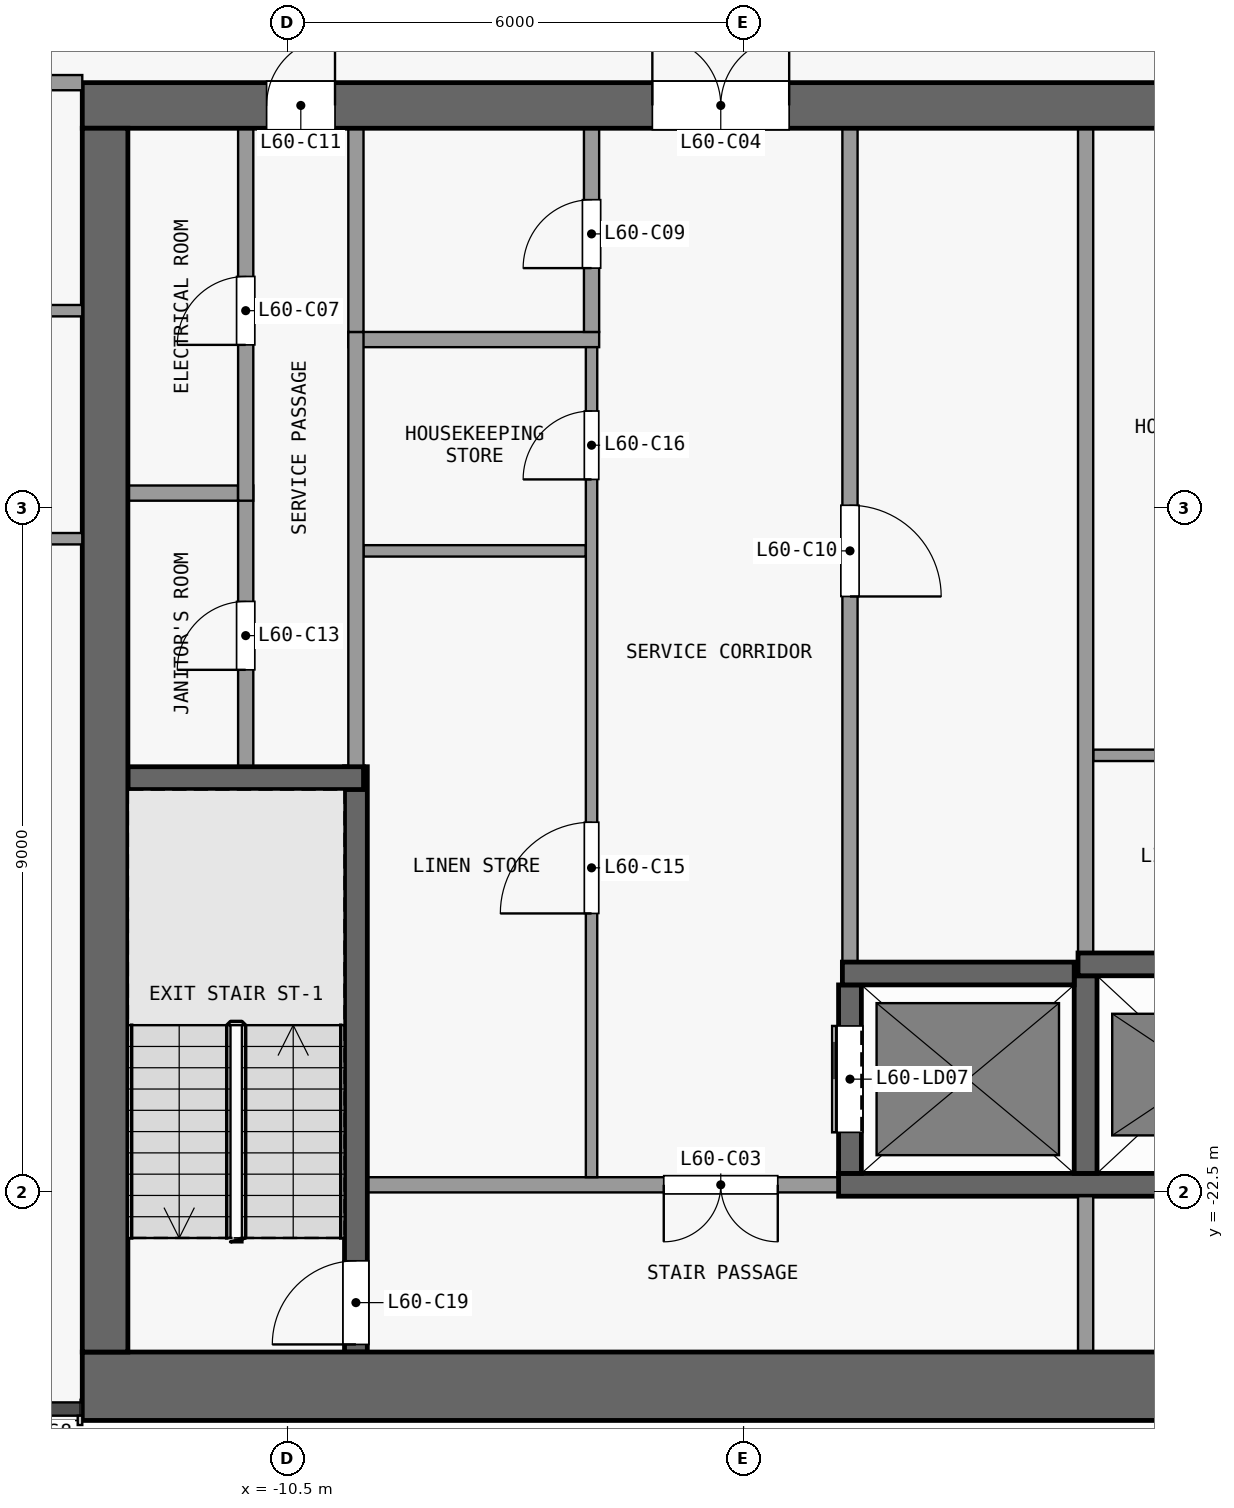
"""IFC4 building model, lengths in metres.
Left out: names, types, materials, properties, quantities, classifications, styles, units other than length and angle.
Written with IfcOpenShell. Run it as: python <this file> out.ifc"""

import sys

from ifc_helpers import new_model, si_unit, direction, frame, frame_2d, origin, place, context, subcontext, project, spatial, rectangle, extrude, element, fill, save


model = new_model("IFC4")
c1 = context("Model", 3, precision=1e-05, world=origin(), true_north=direction((0.0, 1.0)))
c2 = subcontext(c1, "Body", "Model", "MODEL_VIEW")
j1 = project(units=[si_unit("LENGTHUNIT", "METRE"), si_unit("PLANEANGLEUNIT", "RADIAN")], contexts=[c1])
p1 = place(None, origin())
s1 = spatial("IfcSite", under=j1, at=p1, CompositionType="ELEMENT")
p2 = place(p1, origin())
s2 = spatial("IfcBuilding", under=s1, at=p2, CompositionType="ELEMENT")
p3 = place(p2, frame((0.0, 0.0, 237.5)))
s3 = spatial("IfcBuildingStorey", under=s2, at=p3, CompositionType="ELEMENT", Elevation=237.5)
p4 = place(p3, frame((-13.2, -25.05, 0.0), z_axis=(0.0, 0.0, 1.0), x_axis=(1.0, 0.0, 0.0)))
e1 = element("IfcWall", 1, at=p4, inside=s3, PredefinedType="SHEAR", context=c2, shape_type="SweptSolid", body=[
    extrude(rectangle(XDim=26.4, YDim=0.9, at=frame_2d((13.2, 0.0))), origin(), (0.0, 0.0, 1.0), 3.3),
])
p5 = place(p3, frame((-13.2, -8.2, 0.0), z_axis=(0.0, 0.0, 1.0), x_axis=(1.0, 0.0, 0.0)))
e2 = element("IfcWall", 2, at=p5, inside=s3, PredefinedType="SHEAR", context=c2, shape_type="SweptSolid", body=[
    extrude(rectangle(XDim=26.4, YDim=0.6, at=frame_2d((13.2, 0.0))), origin(), (0.0, 0.0, 1.0), 3.3),
])
p6 = place(p5, frame((7.5, 0.0, 0.0)))
e3 = element("IfcOpeningElement", 3, at=p6, cuts=e2, PredefinedType="OPENING", context=c2, shape_type="SweptSolid", body=[
    extrude(rectangle(XDim=1.8, YDim=2.1, at=frame_2d((0.9, 1.05))), frame((0.0, 0.31, 0.0), z_axis=(0.0, -1.0, 0.0), x_axis=(1.0, 0.0, 0.0)), (0.0, 0.0, 1.0), 0.62),
])
p7 = place(p5, frame((17.1, 0.0, 0.0)))
e4 = element("IfcOpeningElement", 4, at=p7, cuts=e2, PredefinedType="OPENING", context=c2, shape_type="SweptSolid", body=[
    extrude(rectangle(XDim=1.8, YDim=2.1, at=frame_2d((0.9, 1.05))), frame((0.0, 0.31, 0.0), z_axis=(0.0, -1.0, 0.0), x_axis=(1.0, 0.0, 0.0)), (0.0, 0.0, 1.0), 0.62),
])
p8 = place(p5, frame((2.425, 0.0, 0.0)))
e5 = element("IfcOpeningElement", 5, at=p8, cuts=e2, PredefinedType="OPENING", context=c2, shape_type="SweptSolid", body=[
    extrude(rectangle(XDim=0.9, YDim=2.1, at=frame_2d((0.45, 1.05))), frame((0.0, 0.31, 0.0), z_axis=(0.0, -1.0, 0.0), x_axis=(1.0, 0.0, 0.0)), (0.0, 0.0, 1.0), 0.62),
])
p9 = place(p5, frame((23.075, 0.0, 0.0)))
e6 = element("IfcOpeningElement", 6, at=p9, cuts=e2, PredefinedType="OPENING", context=c2, shape_type="SweptSolid", body=[
    extrude(rectangle(XDim=0.9, YDim=2.1, at=frame_2d((0.45, 1.05))), frame((0.0, 0.31, 0.0), z_axis=(0.0, -1.0, 0.0), x_axis=(1.0, 0.0, 0.0)), (0.0, 0.0, 1.0), 0.62),
])
p10 = place(p3, frame((-12.9, -24.6, 0.0), z_axis=(0.0, 0.0, 1.0), x_axis=(0.0, 1.0, 0.0)))
e7 = element("IfcWall", 7, at=p10, inside=s3, PredefinedType="SHEAR", context=c2, shape_type="SweptSolid", body=[
    extrude(rectangle(XDim=16.1, YDim=0.6, at=frame_2d((8.05, 0.0))), origin(), (0.0, 0.0, 1.0), 3.3),
])
p11 = place(p3, frame((-3.25, -22.4, 0.0), z_axis=(0.0, 0.0, 1.0), x_axis=(-1.0, 0.0, 0.0)))
e8 = element("IfcWall", 8, at=p11, inside=s3, PredefinedType="PARTITIONING", context=c2, shape_type="SweptSolid", body=[
    extrude(rectangle(XDim=6.2, YDim=0.2, at=frame_2d((3.1, 0.0))), origin(), (0.0, 0.0, 1.0), 3.3),
])
p12 = place(p11, frame((0.8, 0.0, 0.0)))
e9 = element("IfcOpeningElement", 9, at=p12, cuts=e8, PredefinedType="OPENING", context=c2, shape_type="SweptSolid", body=[
    extrude(rectangle(XDim=1.5, YDim=2.1, at=frame_2d((0.75, 1.05))), frame((0.0, 0.11, 0.0), z_axis=(0.0, -1.0, 0.0), x_axis=(1.0, 0.0, 0.0)), (0.0, 0.0, 1.0), 0.22),
])
p13 = place(p3, frame((-3.25, -22.4, 0.0), z_axis=(0.0, 0.0, 1.0), x_axis=(1.0, 0.0, 0.0)))
e10 = element("IfcWall", 10, at=p13, inside=s3, PredefinedType="SHEAR", context=c2, shape_type="SweptSolid", body=[
    extrude(rectangle(XDim=6.5, YDim=0.3, at=frame_2d((3.25, 0.0))), origin(), (0.0, 0.0, 1.0), 3.3),
])
p14 = place(p3, frame((-3.2, -19.62, 0.0), z_axis=(0.0, 0.0, 1.0), x_axis=(1.0, 0.0, 0.0)))
e11 = element("IfcWall", 11, at=p14, inside=s3, PredefinedType="SHEAR", context=c2, shape_type="SweptSolid", body=[
    extrude(rectangle(XDim=3.05, YDim=0.3, at=frame_2d((1.525, 0.0))), origin(), (0.0, 0.0, 1.0), 3.3),
])
p15 = place(p3, frame((-0.1, -19.5, 0.0), z_axis=(0.0, 0.0, 1.0), x_axis=(1.0, 0.0, 0.0)))
e12 = element("IfcWall", 12, at=p15, inside=s3, PredefinedType="SHEAR", context=c2, shape_type="SweptSolid", body=[
    extrude(rectangle(XDim=3.275, YDim=0.3, at=frame_2d((1.638, 0.0))), origin(), (0.0, 0.0, 1.0), 3.3),
])
p16 = place(p3, frame((-12.6, -17.05, 0.0), z_axis=(0.0, 0.0, 1.0), x_axis=(1.0, 0.0, 0.0)))
e13 = element("IfcWall", 13, at=p16, inside=s3, PredefinedType="SHEAR", context=c2, shape_type="SweptSolid", body=[
    extrude(rectangle(XDim=3.1, YDim=0.3, at=frame_2d((1.55, 0.0))), origin(), (0.0, 0.0, 1.0), 3.3),
])
p17 = place(p3, frame((0.1, -16.75, 0.0), z_axis=(0.0, 0.0, 1.0), x_axis=(1.0, 0.0, 0.0)))
e14 = element("IfcWall", 14, at=p17, inside=s3, PredefinedType="PARTITIONING", context=c2, shape_type="SweptSolid", body=[
    extrude(rectangle(XDim=2.925, YDim=0.15, at=frame_2d((1.462, 0.0))), origin(), (0.0, 0.0, 1.0), 3.3),
])
p18 = place(p3, frame((-9.5, -14.06, 0.0), z_axis=(0.0, 0.0, 1.0), x_axis=(1.0, 0.0, 0.0)))
e15 = element("IfcWall", 15, at=p18, inside=s3, PredefinedType="PARTITIONING", context=c2, shape_type="SweptSolid", body=[
    extrude(rectangle(XDim=2.925, YDim=0.15, at=frame_2d((1.462, 0.0))), origin(), (0.0, 0.0, 1.0), 3.3),
])
p19 = place(p3, frame((-12.6, -13.3, 0.0), z_axis=(0.0, 0.0, 1.0), x_axis=(1.0, 0.0, 0.0)))
e16 = element("IfcWall", 16, at=p19, inside=s3, PredefinedType="PARTITIONING", context=c2, shape_type="SweptSolid", body=[
    extrude(rectangle(XDim=1.45, YDim=0.2, at=frame_2d((0.725, 0.0))), origin(), (0.0, 0.0, 1.0), 3.3),
])
p20 = place(p3, frame((-9.7, -11.28, 0.0), z_axis=(0.0, 0.0, 1.0), x_axis=(1.0, 0.0, 0.0)))
e17 = element("IfcWall", 17, at=p20, inside=s3, PredefinedType="PARTITIONING", context=c2, shape_type="SweptSolid", body=[
    extrude(rectangle(XDim=3.3, YDim=0.2, at=frame_2d((1.65, 0.0))), origin(), (0.0, 0.0, 1.0), 3.3),
])
p21 = place(p3, frame((-11.05, -16.9, 0.0), z_axis=(0.0, 0.0, 1.0), x_axis=(0.0, 1.0, 0.0)))
e18 = element("IfcWall", 18, at=p21, inside=s3, PredefinedType="PARTITIONING", context=c2, shape_type="SweptSolid", body=[
    extrude(rectangle(XDim=3.7, YDim=0.2, at=frame_2d((1.85, 0.0))), origin(), (0.0, 0.0, 1.0), 3.3),
])
p22 = place(p21, frame((1.275, 0.0, 0.0)))
e19 = element("IfcOpeningElement", 19, at=p22, cuts=e18, PredefinedType="OPENING", context=c2, shape_type="SweptSolid", body=[
    extrude(rectangle(XDim=0.9, YDim=2.1, at=frame_2d((0.45, 1.05))), frame((0.0, 0.11, 0.0), z_axis=(0.0, -1.0, 0.0), x_axis=(1.0, 0.0, 0.0)), (0.0, 0.0, 1.0), 0.22),
])
p23 = place(p3, frame((-11.05, -13.4, 0.0), z_axis=(0.0, 0.0, 1.0), x_axis=(0.0, 1.0, 0.0)))
e20 = element("IfcWall", 20, at=p23, inside=s3, PredefinedType="PARTITIONING", context=c2, shape_type="SweptSolid", body=[
    extrude(rectangle(XDim=4.9, YDim=0.2, at=frame_2d((2.45, 0.0))), origin(), (0.0, 0.0, 1.0), 3.3),
])
p24 = place(p23, frame((2.05, 0.0, 0.0)))
e21 = element("IfcOpeningElement", 21, at=p24, cuts=e20, PredefinedType="OPENING", context=c2, shape_type="SweptSolid", body=[
    extrude(rectangle(XDim=0.9, YDim=2.1, at=frame_2d((0.45, 1.05))), frame((0.0, 0.11, 0.0), z_axis=(0.0, -1.0, 0.0), x_axis=(1.0, 0.0, 0.0)), (0.0, 0.0, 1.0), 0.22),
])
p25 = place(p3, frame((-9.6, -24.6, 0.0), z_axis=(0.0, 0.0, 1.0), x_axis=(0.0, 1.0, 0.0)))
e22 = element("IfcWall", 22, at=p25, inside=s3, PredefinedType="SHEAR", context=c2, shape_type="SweptSolid", body=[
    extrude(rectangle(XDim=7.7, YDim=0.3, at=frame_2d((3.85, 0.0))), origin(), (0.0, 0.0, 1.0), 3.3),
])
p26 = place(p25, frame((0.1, 0.0, 0.0)))
e23 = element("IfcOpeningElement", 23, at=p26, cuts=e22, PredefinedType="OPENING", context=c2, shape_type="SweptSolid", body=[
    extrude(rectangle(XDim=1.1, YDim=2.1, at=frame_2d((0.55, 1.05))), frame((0.0, 0.16, 0.0), z_axis=(0.0, -1.0, 0.0), x_axis=(1.0, 0.0, 0.0)), (0.0, 0.0, 1.0), 0.32),
])
p27 = place(p3, frame((-9.6, -16.9, 0.0), z_axis=(0.0, 0.0, 1.0), x_axis=(0.0, 1.0, 0.0)))
e24 = element("IfcWall", 24, at=p27, inside=s3, PredefinedType="PARTITIONING", context=c2, shape_type="SweptSolid", body=[
    extrude(rectangle(XDim=5.72, YDim=0.2, at=frame_2d((2.86, 0.0))), origin(), (0.0, 0.0, 1.0), 3.3),
])
p28 = place(p3, frame((-9.6, -11.18, 0.0), z_axis=(0.0, 0.0, 1.0), x_axis=(0.0, 1.0, 0.0)))
e25 = element("IfcWall", 25, at=p28, inside=s3, PredefinedType="PARTITIONING", context=c2, shape_type="SweptSolid", body=[
    extrude(rectangle(XDim=2.68, YDim=0.2, at=frame_2d((1.34, 0.0))), origin(), (0.0, 0.0, 1.0), 3.3),
])
p29 = place(p3, frame((-6.5, -22.3, 0.0), z_axis=(0.0, 0.0, 1.0), x_axis=(0.0, 1.0, 0.0)))
e26 = element("IfcWall", 26, at=p29, inside=s3, PredefinedType="PARTITIONING", context=c2, shape_type="SweptSolid", body=[
    extrude(rectangle(XDim=10.92, YDim=0.15, at=frame_2d((5.46, 0.0))), origin(), (0.0, 0.0, 1.0), 3.3),
])
p30 = place(p29, frame((3.47, 0.0, 0.0)))
e27 = element("IfcOpeningElement", 27, at=p30, cuts=e26, PredefinedType="OPENING", context=c2, shape_type="SweptSolid", body=[
    extrude(rectangle(XDim=1.2, YDim=2.1, at=frame_2d((0.6, 1.05))), frame((0.0, 0.085, 0.0), z_axis=(0.0, -1.0, 0.0), x_axis=(1.0, 0.0, 0.0)), (0.0, 0.0, 1.0), 0.17),
])
p31 = place(p29, frame((9.18, 0.0, 0.0)))
e28 = element("IfcOpeningElement", 28, at=p31, cuts=e26, PredefinedType="OPENING", context=c2, shape_type="SweptSolid", body=[
    extrude(rectangle(XDim=0.9, YDim=2.1, at=frame_2d((0.45, 1.05))), frame((0.0, 0.085, 0.0), z_axis=(0.0, -1.0, 0.0), x_axis=(1.0, 0.0, 0.0)), (0.0, 0.0, 1.0), 0.17),
])
p32 = place(p3, frame((-6.5, -11.18, 0.0), z_axis=(0.0, 0.0, 1.0), x_axis=(0.0, 1.0, 0.0)))
e29 = element("IfcWall", 29, at=p32, inside=s3, PredefinedType="PARTITIONING", context=c2, shape_type="SweptSolid", body=[
    extrude(rectangle(XDim=2.68, YDim=0.2, at=frame_2d((1.34, 0.0))), origin(), (0.0, 0.0, 1.0), 3.3),
])
p33 = place(p32, frame((0.84, 0.0, 0.0)))
e30 = element("IfcOpeningElement", 30, at=p33, cuts=e29, PredefinedType="OPENING", context=c2, shape_type="SweptSolid", body=[
    extrude(rectangle(XDim=0.9, YDim=2.1, at=frame_2d((0.45, 1.05))), frame((0.0, 0.11, 0.0), z_axis=(0.0, -1.0, 0.0), x_axis=(1.0, 0.0, 0.0)), (0.0, 0.0, 1.0), 0.22),
])
p34 = place(p3, frame((-3.1, -22.25, 0.0), z_axis=(0.0, 0.0, 1.0), x_axis=(0.0, 1.0, 0.0)))
e31 = element("IfcWall", 31, at=p34, inside=s3, PredefinedType="SHEAR", context=c2, shape_type="SweptSolid", body=[
    extrude(rectangle(XDim=2.48, YDim=0.3, at=frame_2d((1.24, 0.0))), origin(), (0.0, 0.0, 1.0), 3.3),
])
p35 = place(p34, frame((0.54, 0.0, 0.0)))
e32 = element("IfcOpeningElement", 32, at=p35, cuts=e31, PredefinedType="OPENING", context=c2, shape_type="SweptSolid", body=[
    extrude(rectangle(XDim=1.4, YDim=2.1, at=frame_2d((0.7, 1.05))), frame((0.0, 0.16, 0.0), z_axis=(0.0, -1.0, 0.0), x_axis=(1.0, 0.0, 0.0)), (0.0, 0.0, 1.0), 0.32),
])
p36 = place(p3, frame((-3.1, -8.5, 0.0), z_axis=(0.0, 0.0, 1.0), x_axis=(0.0, -1.0, 0.0)))
e33 = element("IfcWall", 33, at=p36, inside=s3, PredefinedType="PARTITIONING", context=c2, shape_type="SweptSolid", body=[
    extrude(rectangle(XDim=10.97, YDim=0.2, at=frame_2d((5.485, 0.0))), origin(), (0.0, 0.0, 1.0), 3.3),
])
p37 = place(p36, frame((4.96, 0.0, 0.0)))
e34 = element("IfcOpeningElement", 34, at=p37, cuts=e33, PredefinedType="OPENING", context=c2, shape_type="SweptSolid", body=[
    extrude(rectangle(XDim=1.2, YDim=2.1, at=frame_2d((0.6, 1.05))), frame((0.0, 0.11, 0.0), z_axis=(0.0, -1.0, 0.0), x_axis=(1.0, 0.0, 0.0)), (0.0, 0.0, 1.0), 0.22),
])
p38 = place(p3, frame((0.0, -24.6, 0.0), z_axis=(0.0, 0.0, 1.0), x_axis=(0.0, 1.0, 0.0)))
e35 = element("IfcWall", 35, at=p38, inside=s3, PredefinedType="PARTITIONING", context=c2, shape_type="SweptSolid", body=[
    extrude(rectangle(XDim=2.05, YDim=0.2, at=frame_2d((1.025, 0.0))), origin(), (0.0, 0.0, 1.0), 3.3),
])
p39 = place(p3, frame((0.0, -22.25, 0.0), z_axis=(0.0, 0.0, 1.0), x_axis=(0.0, 1.0, 0.0)))
e36 = element("IfcWall", 36, at=p39, inside=s3, PredefinedType="SHEAR", context=c2, shape_type="SweptSolid", body=[
    extrude(rectangle(XDim=2.6, YDim=0.3, at=frame_2d((1.3, 0.0))), origin(), (0.0, 0.0, 1.0), 3.3),
])
p40 = place(p3, frame((0.0, -19.35, 0.0), z_axis=(0.0, 0.0, 1.0), x_axis=(0.0, 1.0, 0.0)))
e37 = element("IfcWall", 37, at=p40, inside=s3, PredefinedType="PARTITIONING", context=c2, shape_type="SweptSolid", body=[
    extrude(rectangle(XDim=10.85, YDim=0.2, at=frame_2d((5.425, 0.0))), origin(), (0.0, 0.0, 1.0), 3.3),
])
p41 = place(p3, frame((-19.262, -13.9, 0.0), z_axis=(0.0, 0.0, 1.0), x_axis=(1.0, 0.0, 0.0)))
e38 = element("IfcWall", 38, at=p41, inside=s3, PredefinedType="PARTITIONING", context=c2, shape_type="SweptSolid", body=[
    extrude(rectangle(XDim=6.062, YDim=0.15, at=frame_2d((3.031, 0.0))), origin(), (0.0, 0.0, 1.0), 3.3),
])
p42 = place(p41, frame((0.712, 0.0, 0.0)))
e39 = element("IfcOpeningElement", 39, at=p42, cuts=e38, PredefinedType="OPENING", context=c2, shape_type="SweptSolid", body=[
    extrude(rectangle(XDim=0.9, YDim=2.1, at=frame_2d((0.45, 1.05))), frame((0.0, 0.085, 0.0), z_axis=(0.0, -1.0, 0.0), x_axis=(1.0, 0.0, 0.0)), (0.0, 0.0, 1.0), 0.17),
])
p43 = place(p3, frame((-19.262, -10.9, 0.0), z_axis=(0.0, 0.0, 1.0), x_axis=(1.0, 0.0, 0.0)))
e40 = element("IfcWall", 40, at=p43, inside=s3, PredefinedType="PARTITIONING", context=c2, shape_type="SweptSolid", body=[
    extrude(rectangle(XDim=6.062, YDim=0.15, at=frame_2d((3.031, 0.0))), origin(), (0.0, 0.0, 1.0), 3.3),
])
p44 = place(p43, frame((1.012, 0.0, 0.0)))
e41 = element("IfcOpeningElement", 41, at=p44, cuts=e40, PredefinedType="OPENING", context=c2, shape_type="SweptSolid", body=[
    extrude(rectangle(XDim=0.9, YDim=2.1, at=frame_2d((0.45, 1.05))), frame((0.0, 0.085, 0.0), z_axis=(0.0, -1.0, 0.0), x_axis=(1.0, 0.0, 0.0)), (0.0, 0.0, 1.0), 0.17),
])
p45 = place(p43, frame((4.162, 0.0, 0.0)))
e42 = element("IfcOpeningElement", 42, at=p45, cuts=e40, PredefinedType="OPENING", context=c2, shape_type="SweptSolid", body=[
    extrude(rectangle(XDim=0.9, YDim=2.1, at=frame_2d((0.45, 1.05))), frame((0.0, 0.085, 0.0), z_axis=(0.0, -1.0, 0.0), x_axis=(1.0, 0.0, 0.0)), (0.0, 0.0, 1.0), 0.17),
])
p46 = place(p3, frame((-19.262, -7.9, 0.0), z_axis=(0.0, 0.0, 1.0), x_axis=(1.0, 0.0, 0.0)))
e43 = element("IfcWall", 43, at=p46, inside=s3, PredefinedType="PARTITIONING", context=c2, shape_type="SweptSolid", body=[
    extrude(rectangle(XDim=6.062, YDim=0.2, at=frame_2d((3.031, 0.0))), origin(), (0.0, 0.0, 1.0), 3.3),
])
p47 = place(p46, frame((2.512, 0.0, 0.0)))
e44 = element("IfcOpeningElement", 44, at=p47, cuts=e43, PredefinedType="OPENING", context=c2, shape_type="SweptSolid", body=[
    extrude(rectangle(XDim=1.0, YDim=2.1, at=frame_2d((0.5, 1.05))), frame((0.0, 0.11, 0.0), z_axis=(0.0, -1.0, 0.0), x_axis=(1.0, 0.0, 0.0)), (0.0, 0.0, 1.0), 0.22),
])
p48 = place(p35, origin())
e45 = element("IfcDoor", 45, at=p48, inside=s3, OperationType="DOUBLE_DOOR_SLIDING", PredefinedType="DOOR", context=c2, shape_type="SweptSolid", body=[
    extrude(rectangle(XDim=1.4, YDim=2.1, at=frame_2d((0.7, 1.05))), frame((0.0, 0.025, 0.0), z_axis=(0.0, -1.0, 0.0), x_axis=(1.0, 0.0, 0.0)), (0.0, 0.0, 1.0), 0.05),
])
fill(e32, e45)
p49 = place(p12, origin())
e46 = element("IfcDoor", 46, at=p49, inside=s3, OperationType="DOUBLE_DOOR_SINGLE_SWING", PredefinedType="DOOR", context=c2, shape_type="SweptSolid", body=[
    extrude(rectangle(XDim=1.5, YDim=2.1, at=frame_2d((0.75, 1.05))), frame((0.0, 0.025, 0.0), z_axis=(0.0, -1.0, 0.0), x_axis=(1.0, 0.0, 0.0)), (0.0, 0.0, 1.0), 0.05),
])
fill(e9, e46)
p50 = place(p6, origin())
e47 = element("IfcDoor", 47, at=p50, inside=s3, OperationType="DOUBLE_DOOR_SINGLE_SWING", PredefinedType="DOOR", context=c2, shape_type="SweptSolid", body=[
    extrude(rectangle(XDim=1.8, YDim=2.1, at=frame_2d((0.9, 1.05))), frame((0.0, 0.025, 0.0), z_axis=(0.0, -1.0, 0.0), x_axis=(1.0, 0.0, 0.0)), (0.0, 0.0, 1.0), 0.05),
])
fill(e3, e47)
p51 = place(p24, origin())
e48 = element("IfcDoor", 48, at=p51, inside=s3, OperationType="SINGLE_SWING_LEFT", PredefinedType="DOOR", context=c2, shape_type="SweptSolid", body=[
    extrude(rectangle(XDim=0.9, YDim=2.1, at=frame_2d((0.45, 1.05))), frame((0.0, 0.025, 0.0), z_axis=(0.0, -1.0, 0.0), x_axis=(1.0, 0.0, 0.0)), (0.0, 0.0, 1.0), 0.05),
])
fill(e21, e48)
p52 = place(p33, origin())
e49 = element("IfcDoor", 49, at=p52, inside=s3, OperationType="SINGLE_SWING_LEFT", PredefinedType="DOOR", context=c2, shape_type="SweptSolid", body=[
    extrude(rectangle(XDim=0.9, YDim=2.1, at=frame_2d((0.45, 1.05))), frame((0.0, 0.025, 0.0), z_axis=(0.0, -1.0, 0.0), x_axis=(1.0, 0.0, 0.0)), (0.0, 0.0, 1.0), 0.05),
])
fill(e30, e49)
p53 = place(p37, origin())
e50 = element("IfcDoor", 50, at=p53, inside=s3, OperationType="SINGLE_SWING_RIGHT", PredefinedType="DOOR", context=c2, shape_type="SweptSolid", body=[
    extrude(rectangle(XDim=1.2, YDim=2.1, at=frame_2d((0.6, 1.05))), frame((0.0, 0.025, 0.0), z_axis=(0.0, -1.0, 0.0), x_axis=(1.0, 0.0, 0.0)), (0.0, 0.0, 1.0), 0.05),
])
fill(e34, e50)
p54 = place(p8, origin())
e51 = element("IfcDoor", 51, at=p54, inside=s3, OperationType="SINGLE_SWING_RIGHT", PredefinedType="DOOR", context=c2, shape_type="SweptSolid", body=[
    extrude(rectangle(XDim=0.9, YDim=2.1, at=frame_2d((0.45, 1.05))), frame((0.0, 0.025, 0.0), z_axis=(0.0, -1.0, 0.0), x_axis=(1.0, 0.0, 0.0)), (0.0, 0.0, 1.0), 0.05),
])
fill(e5, e51)
p55 = place(p22, origin())
e52 = element("IfcDoor", 52, at=p55, inside=s3, OperationType="SINGLE_SWING_LEFT", PredefinedType="DOOR", context=c2, shape_type="SweptSolid", body=[
    extrude(rectangle(XDim=0.9, YDim=2.1, at=frame_2d((0.45, 1.05))), frame((0.0, 0.025, 0.0), z_axis=(0.0, -1.0, 0.0), x_axis=(1.0, 0.0, 0.0)), (0.0, 0.0, 1.0), 0.05),
])
fill(e19, e52)
p56 = place(p30, origin())
e53 = element("IfcDoor", 53, at=p56, inside=s3, OperationType="SINGLE_SWING_LEFT", PredefinedType="DOOR", context=c2, shape_type="SweptSolid", body=[
    extrude(rectangle(XDim=1.2, YDim=2.1, at=frame_2d((0.6, 1.05))), frame((0.0, 0.025, 0.0), z_axis=(0.0, -1.0, 0.0), x_axis=(1.0, 0.0, 0.0)), (0.0, 0.0, 1.0), 0.05),
])
fill(e27, e53)
p57 = place(p31, origin())
e54 = element("IfcDoor", 54, at=p57, inside=s3, OperationType="SINGLE_SWING_LEFT", PredefinedType="DOOR", context=c2, shape_type="SweptSolid", body=[
    extrude(rectangle(XDim=0.9, YDim=2.1, at=frame_2d((0.45, 1.05))), frame((0.0, 0.025, 0.0), z_axis=(0.0, -1.0, 0.0), x_axis=(1.0, 0.0, 0.0)), (0.0, 0.0, 1.0), 0.05),
])
fill(e28, e54)
p58 = place(p26, origin())
e55 = element("IfcDoor", 55, at=p58, inside=s3, OperationType="SINGLE_SWING_LEFT", PredefinedType="DOOR", context=c2, shape_type="SweptSolid", body=[
    extrude(rectangle(XDim=1.1, YDim=2.1, at=frame_2d((0.55, 1.05))), frame((0.0, 0.025, 0.0), z_axis=(0.0, -1.0, 0.0), x_axis=(1.0, 0.0, 0.0)), (0.0, 0.0, 1.0), 0.05),
])
fill(e23, e55)
save(model, sys.argv[1])
